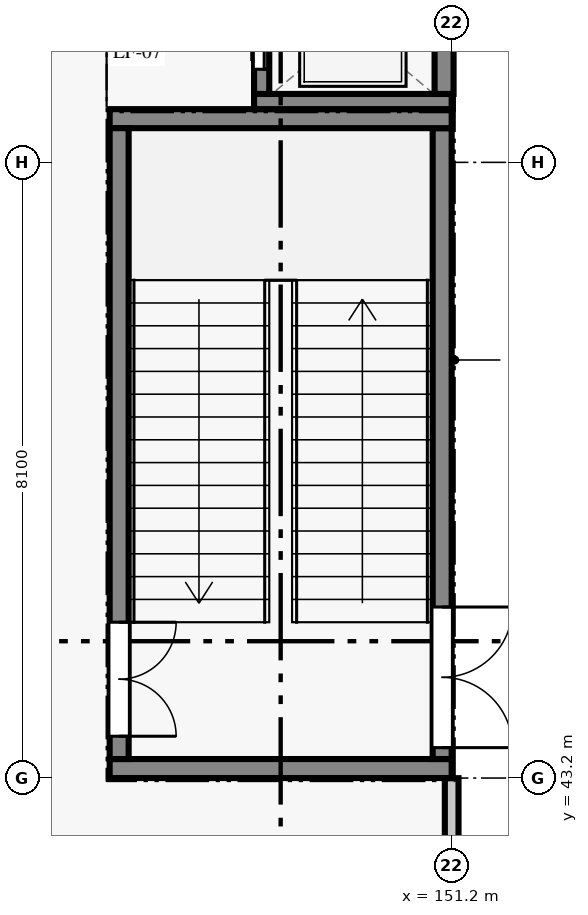
"""IFC4 building model, lengths in metres.
Left out: names, types, materials, properties, quantities, classifications, styles, units other than length and angle.
Written with IfcOpenShell. Run it as: python <this file> out.ifc"""

import sys

from ifc_helpers import new_model, si_unit, direction, frame, frame_2d, origin, place, context, subcontext, project, spatial, rectangle, extrude, element, fill, save


model = new_model("IFC4")
c1 = context("Model", 3, precision=1e-05, world=origin(), true_north=direction((0.0, 1.0)))
c2 = subcontext(c1, "Body", "Model", "MODEL_VIEW")
j1 = project(units=[si_unit("LENGTHUNIT", "METRE"), si_unit("PLANEANGLEUNIT", "RADIAN")], contexts=[c1])
p1 = place(None, origin())
s1 = spatial("IfcSite", under=j1, at=p1, CompositionType="ELEMENT")
p2 = place(p1, origin())
s2 = spatial("IfcBuilding", under=s1, at=p2, CompositionType="ELEMENT")
p3 = place(p2, origin())
s3 = spatial("IfcBuildingStorey", under=s2, at=p3, CompositionType="ELEMENT", Elevation=0.0)
p4 = place(p3, frame((151.2, 36.32, 0.0), z_axis=(0.0, 0.0, 1.0), x_axis=(0.0, 1.0, 0.0)))
e1 = element("IfcWall", 1, at=p4, inside=s3, PredefinedType="STANDARD", context=c2, shape_type="SweptSolid", body=[
    extrude(rectangle(XDim=6.878, YDim=0.18, at=frame_2d((3.439, 0.0))), origin(), (0.0, 0.0, 1.0), 4.565),
])
p5 = place(p4, frame((2.599, 0.0, 0.0)))
e2 = element("IfcOpeningElement", 2, at=p5, cuts=e1, PredefinedType="OPENING", context=c2, shape_type="SweptSolid", body=[
    extrude(rectangle(XDim=1.68, YDim=2.2, at=frame_2d((0.84, 1.1))), frame((0.0, 0.1, 0.0), z_axis=(0.0, -1.0, 0.0), x_axis=(1.0, 0.0, 0.0)), (0.0, 0.0, 1.0), 0.2),
])
p6 = place(p3, frame((146.7, 43.325, 0.0), z_axis=(0.0, 0.0, 1.0), x_axis=(1.0, 0.0, 0.0)))
e3 = element("IfcWall", 3, at=p6, inside=s3, PredefinedType="SHEAR", context=c2, shape_type="SweptSolid", body=[
    extrude(rectangle(XDim=4.5, YDim=0.25, at=frame_2d((2.25, 0.0))), origin(), (0.0, 0.0, 1.0), 4.565),
])
p7 = place(p3, frame((151.075, 43.45, 0.0), z_axis=(0.0, 0.0, 1.0), x_axis=(0.0, 1.0, 0.0)))
e4 = element("IfcWall", 4, at=p7, inside=s3, PredefinedType="SHEAR", context=c2, shape_type="SweptSolid", body=[
    extrude(rectangle(XDim=8.3, YDim=0.25, at=frame_2d((4.15, 0.0))), origin(), (0.0, 0.0, 1.0), 4.565),
])
p8 = place(p7, frame((0.15, 0.0, 0.0)))
e5 = element("IfcOpeningElement", 5, at=p8, cuts=e4, PredefinedType="OPENING", context=c2, shape_type="SweptSolid", body=[
    extrude(rectangle(XDim=1.85, YDim=2.2, at=frame_2d((0.925, 1.1))), frame((0.0, 0.135, 0.0), z_axis=(0.0, -1.0, 0.0), x_axis=(1.0, 0.0, 0.0)), (0.0, 0.0, 1.0), 0.27),
])
p9 = place(p3, frame((151.2, 51.875, 0.0), z_axis=(0.0, 0.0, 1.0), x_axis=(-1.0, 0.0, 0.0)))
e6 = element("IfcWall", 6, at=p9, inside=s3, PredefinedType="SHEAR", context=c2, shape_type="SweptSolid", body=[
    extrude(rectangle(XDim=4.5, YDim=0.25, at=frame_2d((2.25, 0.0))), origin(), (0.0, 0.0, 1.0), 4.565),
])
p10 = place(p3, frame((146.825, 51.75, 0.0), z_axis=(0.0, 0.0, 1.0), x_axis=(0.0, -1.0, 0.0)))
e7 = element("IfcWall", 7, at=p10, inside=s3, PredefinedType="SHEAR", context=c2, shape_type="SweptSolid", body=[
    extrude(rectangle(XDim=8.3, YDim=0.25, at=frame_2d((4.15, 0.0))), origin(), (0.0, 0.0, 1.0), 4.565),
])
p11 = place(p10, frame((6.5, 0.0, 0.0)))
e8 = element("IfcOpeningElement", 8, at=p11, cuts=e7, PredefinedType="OPENING", context=c2, shape_type="SweptSolid", body=[
    extrude(rectangle(XDim=1.5, YDim=2.15, at=frame_2d((0.75, 1.075))), frame((0.0, 0.135, 0.0), z_axis=(0.0, -1.0, 0.0), x_axis=(1.0, 0.0, 0.0)), (0.0, 0.0, 1.0), 0.27),
])
p12 = place(p3, frame((148.6, 52.1, 0.0), z_axis=(0.0, 0.0, 1.0), x_axis=(1.0, 0.0, 0.0)))
e9 = element("IfcWall", 9, at=p12, inside=s3, PredefinedType="SHEAR", context=c2, shape_type="SweptSolid", body=[
    extrude(rectangle(XDim=2.6, YDim=0.2, at=frame_2d((1.3, 0.0))), origin(), (0.0, 0.0, 1.0), 4.565),
])
p13 = place(p3, frame((151.1, 52.2, 0.0), z_axis=(0.0, 0.0, 1.0), x_axis=(0.0, 1.0, 0.0)))
e10 = element("IfcWall", 10, at=p13, inside=s3, PredefinedType="SHEAR", context=c2, shape_type="SweptSolid", body=[
    extrude(rectangle(XDim=1.8, YDim=0.25, at=frame_2d((0.9, 0.0))), origin(), (0.0, 0.0, 1.0), 4.565),
])
p14 = place(p3, frame((148.7, 54.0, 0.0), z_axis=(0.0, 0.0, 1.0), x_axis=(0.0, -1.0, 0.0)))
e11 = element("IfcWall", 11, at=p14, inside=s3, PredefinedType="SHEAR", context=c2, shape_type="SweptSolid", body=[
    extrude(rectangle(XDim=1.8, YDim=0.2, at=frame_2d((0.9, 0.0))), origin(), (0.0, 0.0, 1.0), 4.565),
])
p15 = place(p14, frame((0.325, 0.0, 0.0)))
e12 = element("IfcOpeningElement", 12, at=p15, cuts=e11, PredefinedType="OPENING", context=c2, shape_type="SweptSolid", body=[
    extrude(rectangle(XDim=1.15, YDim=2.15, at=frame_2d((0.575, 1.075))), frame((0.0, 0.11, 0.0), z_axis=(0.0, -1.0, 0.0), x_axis=(1.0, 0.0, 0.0)), (0.0, 0.0, 1.0), 0.22),
])
p16 = place(p8, frame((1.85, 0.0, 0.0), z_axis=(0.0, 0.0, 1.0), x_axis=(-1.0, 0.0, 0.0)))
e13 = element("IfcDoor", 13, at=p16, inside=s3, OperationType="DOUBLE_DOOR_SINGLE_SWING", PredefinedType="DOOR", context=c2, shape_type="SweptSolid", body=[
    extrude(rectangle(XDim=1.85, YDim=2.2, at=frame_2d((0.925, 1.1))), frame((0.0, 0.025, 0.0), z_axis=(0.0, -1.0, 0.0), x_axis=(1.0, 0.0, 0.0)), (0.0, 0.0, 1.0), 0.05),
])
fill(e5, e13)
p17 = place(p11, origin())
e14 = element("IfcDoor", 14, at=p17, inside=s3, OperationType="DOUBLE_DOOR_SINGLE_SWING", PredefinedType="DOOR", context=c2, shape_type="SweptSolid", body=[
    extrude(rectangle(XDim=1.5, YDim=2.15, at=frame_2d((0.75, 1.075))), frame((0.0, 0.025, 0.0), z_axis=(0.0, -1.0, 0.0), x_axis=(1.0, 0.0, 0.0)), (0.0, 0.0, 1.0), 0.05),
])
fill(e8, e14)
p18 = place(p15, frame((1.15, 0.0, 0.0), z_axis=(0.0, 0.0, 1.0), x_axis=(-1.0, 0.0, 0.0)))
e15 = element("IfcDoor", 15, at=p18, inside=s3, OperationType="DOUBLE_DOOR_SLIDING", PredefinedType="DOOR", context=c2, shape_type="SweptSolid", body=[
    extrude(rectangle(XDim=1.15, YDim=2.15, at=frame_2d((0.575, 1.075))), frame((0.0, 0.025, 0.0), z_axis=(0.0, -1.0, 0.0), x_axis=(1.0, 0.0, 0.0)), (0.0, 0.0, 1.0), 0.05),
])
fill(e12, e15)
save(model, sys.argv[1])
